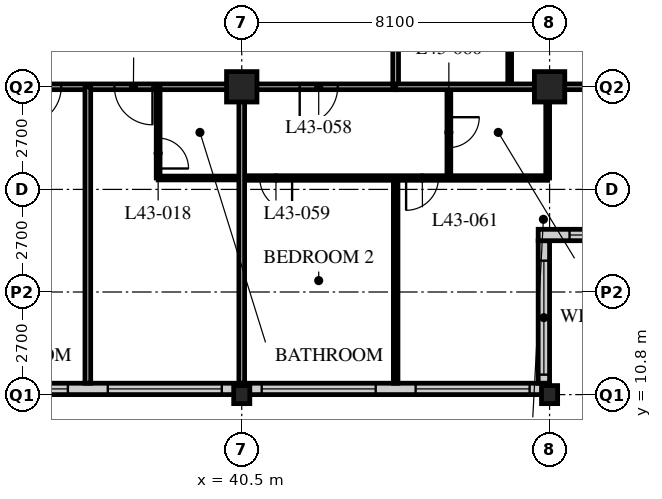
"""IFC4 building model, lengths in metres.
Left out: names, types, materials, properties, quantities, classifications, styles, units other than length and angle.
Written with IfcOpenShell. Run it as: python <this file> out.ifc"""

import sys

from ifc_helpers import new_model, si_unit, direction, frame, frame_2d, origin, origin_2d, place, context, subcontext, project, spatial, rectangle, hollow_rectangle, i_section, extrude, element, fill, save


model = new_model("IFC4")
c1 = context("Model", 3, precision=1e-05, world=origin(), true_north=direction((0.0, 1.0)))
c2 = subcontext(c1, "Body", "Model", "MODEL_VIEW")
j1 = project(units=[si_unit("LENGTHUNIT", "METRE"), si_unit("PLANEANGLEUNIT", "RADIAN")], contexts=[c1])
p1 = place(None, origin())
s1 = spatial("IfcSite", under=j1, at=p1, CompositionType="ELEMENT")
p2 = place(p1, origin())
s2 = spatial("IfcBuilding", under=s1, at=p2, CompositionType="ELEMENT")
p3 = place(p2, frame((0.0, 0.0, 170.4)))
s3 = spatial("IfcBuildingStorey", under=s2, at=p3, CompositionType="ELEMENT", Elevation=170.4)
p4 = place(p3, frame((40.5, 10.8, 0.0), z_axis=(0.0, 0.0, 1.0), x_axis=(1.0, 0.0, 0.0)))
e1 = element("IfcColumn", 1, at=p4, inside=s3, PredefinedType="COLUMN", context=c2, shape_type="SweptSolid", body=[
    extrude(i_section(OverallWidth=0.424, OverallDepth=0.475, WebThickness=0.048, FlangeThickness=0.077, FilletRadius=0.015, at=origin_2d()), origin(), (0.0, 0.0, 1.0), 3.6),
])
p5 = place(p3, frame((40.5, 18.9, 0.0), z_axis=(0.0, 0.0, 1.0), x_axis=(1.0, 0.0, 0.0)))
e2 = element("IfcColumn", 2, at=p5, inside=s3, PredefinedType="COLUMN", context=c2, shape_type="SweptSolid", body=[
    extrude(hollow_rectangle(XDim=0.8, YDim=0.8, WallThickness=0.08, at=origin_2d()), origin(), (0.0, 0.0, 1.0), 3.6),
])
p6 = place(p3, frame((48.6, 10.8, 0.0), z_axis=(0.0, 0.0, 1.0), x_axis=(1.0, 0.0, 0.0)))
e3 = element("IfcColumn", 3, at=p6, inside=s3, PredefinedType="COLUMN", context=c2, shape_type="SweptSolid", body=[
    extrude(i_section(OverallWidth=0.424, OverallDepth=0.475, WebThickness=0.048, FlangeThickness=0.077, FilletRadius=0.015, at=origin_2d()), origin(), (0.0, 0.0, 1.0), 3.6),
])
p7 = place(p3, frame((48.6, 18.9, 0.0), z_axis=(0.0, 0.0, 1.0), x_axis=(1.0, 0.0, 0.0)))
e4 = element("IfcColumn", 4, at=p7, inside=s3, PredefinedType="COLUMN", context=c2, shape_type="SweptSolid", body=[
    extrude(hollow_rectangle(XDim=0.8, YDim=0.8, WallThickness=0.08, at=origin_2d()), origin(), (0.0, 0.0, 1.0), 3.6),
])
p8 = place(p3, frame((8.4, 10.95, 0.0), z_axis=(0.0, 0.0, 1.0), x_axis=(1.0, 0.0, 0.0)))
e5 = element("IfcWall", 5, at=p8, inside=s3, PredefinedType="SOLIDWALL", context=c2, shape_type="SweptSolid", body=[
    extrude(rectangle(XDim=40.2, YDim=0.3, at=frame_2d((20.1, 0.0))), origin(), (0.0, 0.0, 1.0), 3.39),
])
p9 = place(p8, frame((0.225, 0.0, 0.6)))
e6 = element("IfcOpeningElement", 6, at=p9, cuts=e5, PredefinedType="OPENING", context=c2, shape_type="SweptSolid", body=[
    extrude(rectangle(XDim=3.0, YDim=2.4, at=frame_2d((1.5, 1.2))), frame((0.0, 0.16, 0.0), z_axis=(0.0, -1.0, 0.0), x_axis=(1.0, 0.0, 0.0)), (0.0, 0.0, 1.0), 0.32),
])
p10 = place(p8, frame((4.275, 0.0, 0.6)))
e7 = element("IfcOpeningElement", 7, at=p10, cuts=e5, PredefinedType="OPENING", context=c2, shape_type="SweptSolid", body=[
    extrude(rectangle(XDim=3.0, YDim=2.4, at=frame_2d((1.5, 1.2))), frame((0.0, 0.16, 0.0), z_axis=(0.0, -1.0, 0.0), x_axis=(1.0, 0.0, 0.0)), (0.0, 0.0, 1.0), 0.32),
])
p11 = place(p8, frame((8.325, 0.0, 0.6)))
e8 = element("IfcOpeningElement", 8, at=p11, cuts=e5, PredefinedType="OPENING", context=c2, shape_type="SweptSolid", body=[
    extrude(rectangle(XDim=3.0, YDim=2.4, at=frame_2d((1.5, 1.2))), frame((0.0, 0.16, 0.0), z_axis=(0.0, -1.0, 0.0), x_axis=(1.0, 0.0, 0.0)), (0.0, 0.0, 1.0), 0.32),
])
p12 = place(p8, frame((12.375, 0.0, 0.6)))
e9 = element("IfcOpeningElement", 9, at=p12, cuts=e5, PredefinedType="OPENING", context=c2, shape_type="SweptSolid", body=[
    extrude(rectangle(XDim=3.0, YDim=2.4, at=frame_2d((1.5, 1.2))), frame((0.0, 0.16, 0.0), z_axis=(0.0, -1.0, 0.0), x_axis=(1.0, 0.0, 0.0)), (0.0, 0.0, 1.0), 0.32),
])
p13 = place(p8, frame((16.425, 0.0, 0.6)))
e10 = element("IfcOpeningElement", 10, at=p13, cuts=e5, PredefinedType="OPENING", context=c2, shape_type="SweptSolid", body=[
    extrude(rectangle(XDim=3.0, YDim=2.4, at=frame_2d((1.5, 1.2))), frame((0.0, 0.16, 0.0), z_axis=(0.0, -1.0, 0.0), x_axis=(1.0, 0.0, 0.0)), (0.0, 0.0, 1.0), 0.32),
])
p14 = place(p8, frame((20.475, 0.0, 0.6)))
e11 = element("IfcOpeningElement", 11, at=p14, cuts=e5, PredefinedType="OPENING", context=c2, shape_type="SweptSolid", body=[
    extrude(rectangle(XDim=3.0, YDim=2.4, at=frame_2d((1.5, 1.2))), frame((0.0, 0.16, 0.0), z_axis=(0.0, -1.0, 0.0), x_axis=(1.0, 0.0, 0.0)), (0.0, 0.0, 1.0), 0.32),
])
p15 = place(p8, frame((24.525, 0.0, 0.6)))
e12 = element("IfcOpeningElement", 12, at=p15, cuts=e5, PredefinedType="OPENING", context=c2, shape_type="SweptSolid", body=[
    extrude(rectangle(XDim=3.0, YDim=2.4, at=frame_2d((1.5, 1.2))), frame((0.0, 0.16, 0.0), z_axis=(0.0, -1.0, 0.0), x_axis=(1.0, 0.0, 0.0)), (0.0, 0.0, 1.0), 0.32),
])
p16 = place(p8, frame((28.575, 0.0, 0.6)))
e13 = element("IfcOpeningElement", 13, at=p16, cuts=e5, PredefinedType="OPENING", context=c2, shape_type="SweptSolid", body=[
    extrude(rectangle(XDim=3.0, YDim=2.4, at=frame_2d((1.5, 1.2))), frame((0.0, 0.16, 0.0), z_axis=(0.0, -1.0, 0.0), x_axis=(1.0, 0.0, 0.0)), (0.0, 0.0, 1.0), 0.32),
])
p17 = place(p8, frame((32.625, 0.0, 0.6)))
e14 = element("IfcOpeningElement", 14, at=p17, cuts=e5, PredefinedType="OPENING", context=c2, shape_type="SweptSolid", body=[
    extrude(rectangle(XDim=3.0, YDim=2.4, at=frame_2d((1.5, 1.2))), frame((0.0, 0.16, 0.0), z_axis=(0.0, -1.0, 0.0), x_axis=(1.0, 0.0, 0.0)), (0.0, 0.0, 1.0), 0.32),
])
p18 = place(p8, frame((36.675, 0.0, 0.6)))
e15 = element("IfcOpeningElement", 15, at=p18, cuts=e5, PredefinedType="OPENING", context=c2, shape_type="SweptSolid", body=[
    extrude(rectangle(XDim=3.0, YDim=2.4, at=frame_2d((1.5, 1.2))), frame((0.0, 0.16, 0.0), z_axis=(0.0, -1.0, 0.0), x_axis=(1.0, 0.0, 0.0)), (0.0, 0.0, 1.0), 0.32),
])
p19 = place(p3, frame((48.45, 11.1, 0.0), z_axis=(0.0, 0.0, 1.0), x_axis=(0.0, 1.0, 0.0)))
e16 = element("IfcWall", 16, at=p19, inside=s3, PredefinedType="SOLIDWALL", context=c2, shape_type="SweptSolid", body=[
    extrude(rectangle(XDim=3.75, YDim=0.3, at=frame_2d((1.875, 0.0))), origin(), (0.0, 0.0, 1.0), 3.39),
])
p20 = place(p19, frame((0.225, 0.0, 0.6)))
e17 = element("IfcOpeningElement", 17, at=p20, cuts=e16, PredefinedType="OPENING", context=c2, shape_type="SweptSolid", body=[
    extrude(rectangle(XDim=3.0, YDim=2.0, at=frame_2d((1.5, 1.0))), frame((0.0, 0.16, 0.0), z_axis=(0.0, -1.0, 0.0), x_axis=(1.0, 0.0, 0.0)), (0.0, 0.0, 1.0), 0.32),
])
p21 = place(p3, frame((48.3, 15.0, 0.0), z_axis=(0.0, 0.0, 1.0), x_axis=(1.0, 0.0, 0.0)))
e18 = element("IfcWall", 18, at=p21, inside=s3, PredefinedType="SOLIDWALL", context=c2, shape_type="SweptSolid", body=[
    extrude(rectangle(XDim=4.35, YDim=0.3, at=frame_2d((2.175, 0.0))), origin(), (0.0, 0.0, 1.0), 3.39),
])
p22 = place(p21, frame((0.825, 0.0, 0.6)))
e19 = element("IfcOpeningElement", 19, at=p22, cuts=e18, PredefinedType="OPENING", context=c2, shape_type="SweptSolid", body=[
    extrude(rectangle(XDim=3.0, YDim=2.0, at=frame_2d((1.5, 1.0))), frame((0.0, 0.16, 0.0), z_axis=(0.0, -1.0, 0.0), x_axis=(1.0, 0.0, 0.0)), (0.0, 0.0, 1.0), 0.32),
])
p23 = place(p3, frame((12.15, 18.9, 0.0), z_axis=(0.0, 0.0, 1.0), x_axis=(1.0, 0.0, 0.0)))
e20 = element("IfcWall", 20, at=p23, inside=s3, PredefinedType="PARTITIONING", context=c2, shape_type="SweptSolid", body=[
    extrude(rectangle(XDim=32.4, YDim=0.15, at=frame_2d((16.2, 0.0))), origin(), (0.0, 0.0, 1.0), 2.778),
])
p24 = place(p23, frame((6.4, 0.0, 0.0)))
e21 = element("IfcOpeningElement", 21, at=p24, cuts=e20, PredefinedType="OPENING", context=c2, shape_type="SweptSolid", body=[
    extrude(rectangle(XDim=1.0, YDim=2.1, at=frame_2d((0.5, 1.05))), frame((0.0, 0.085, 0.0), z_axis=(0.0, -1.0, 0.0), x_axis=(1.0, 0.0, 0.0)), (0.0, 0.0, 1.0), 0.17),
])
p25 = place(p23, frame((8.8, 0.0, 0.0)))
e22 = element("IfcOpeningElement", 22, at=p25, cuts=e20, PredefinedType="OPENING", context=c2, shape_type="SweptSolid", body=[
    extrude(rectangle(XDim=1.0, YDim=2.1, at=frame_2d((0.5, 1.05))), frame((0.0, 0.085, 0.0), z_axis=(0.0, -1.0, 0.0), x_axis=(1.0, 0.0, 0.0)), (0.0, 0.0, 1.0), 0.17),
])
p26 = place(p23, frame((13.05, 0.0, 0.0)))
e23 = element("IfcOpeningElement", 23, at=p26, cuts=e20, PredefinedType="OPENING", context=c2, shape_type="SweptSolid", body=[
    extrude(rectangle(XDim=1.0, YDim=2.1, at=frame_2d((0.5, 1.05))), frame((0.0, 0.085, 0.0), z_axis=(0.0, -1.0, 0.0), x_axis=(1.0, 0.0, 0.0)), (0.0, 0.0, 1.0), 0.17),
])
p27 = place(p23, frame((22.6, 0.0, 0.0)))
e24 = element("IfcOpeningElement", 24, at=p27, cuts=e20, PredefinedType="OPENING", context=c2, shape_type="SweptSolid", body=[
    extrude(rectangle(XDim=1.0, YDim=2.1, at=frame_2d((0.5, 1.05))), frame((0.0, 0.085, 0.0), z_axis=(0.0, -1.0, 0.0), x_axis=(1.0, 0.0, 0.0)), (0.0, 0.0, 1.0), 0.17),
])
p28 = place(p23, frame((25.0, 0.0, 0.0)))
e25 = element("IfcOpeningElement", 25, at=p28, cuts=e20, PredefinedType="OPENING", context=c2, shape_type="SweptSolid", body=[
    extrude(rectangle(XDim=1.0, YDim=2.1, at=frame_2d((0.5, 1.05))), frame((0.0, 0.085, 0.0), z_axis=(0.0, -1.0, 0.0), x_axis=(1.0, 0.0, 0.0)), (0.0, 0.0, 1.0), 0.17),
])
p29 = place(p23, frame((1.525, 0.0, 0.0)))
e26 = element("IfcOpeningElement", 26, at=p29, cuts=e20, PredefinedType="OPENING", context=c2, shape_type="SweptSolid", body=[
    extrude(rectangle(XDim=1.0, YDim=2.1, at=frame_2d((0.5, 1.05))), frame((0.0, 0.085, 0.0), z_axis=(0.0, -1.0, 0.0), x_axis=(1.0, 0.0, 0.0)), (0.0, 0.0, 1.0), 0.17),
])
p30 = place(p23, frame((29.875, 0.0, 0.0)))
e27 = element("IfcOpeningElement", 27, at=p30, cuts=e20, PredefinedType="OPENING", context=c2, shape_type="SweptSolid", body=[
    extrude(rectangle(XDim=1.0, YDim=2.1, at=frame_2d((0.5, 1.05))), frame((0.0, 0.085, 0.0), z_axis=(0.0, -1.0, 0.0), x_axis=(1.0, 0.0, 0.0)), (0.0, 0.0, 1.0), 0.17),
])
p31 = place(p3, frame((44.55, 18.9, 0.0), z_axis=(0.0, 0.0, 1.0), x_axis=(0.0, 1.0, 0.0)))
e28 = element("IfcWall", 28, at=p31, inside=s3, PredefinedType="PARTITIONING", context=c2, shape_type="SweptSolid", body=[
    extrude(rectangle(XDim=24.3, YDim=0.15, at=frame_2d((12.15, 0.0))), origin(), (0.0, 0.0, 1.0), 3.39),
])
p32 = place(p31, frame((2.35, 0.0, 0.0)))
e29 = element("IfcOpeningElement", 29, at=p32, cuts=e28, PredefinedType="OPENING", context=c2, shape_type="SweptSolid", body=[
    extrude(rectangle(XDim=1.0, YDim=2.1, at=frame_2d((0.5, 1.05))), frame((0.0, 0.085, 0.0), z_axis=(0.0, -1.0, 0.0), x_axis=(1.0, 0.0, 0.0)), (0.0, 0.0, 1.0), 0.17),
])
p33 = place(p31, frame((4.45, 0.0, 0.0)))
e30 = element("IfcOpeningElement", 30, at=p33, cuts=e28, PredefinedType="OPENING", context=c2, shape_type="SweptSolid", body=[
    extrude(rectangle(XDim=1.0, YDim=2.1, at=frame_2d((0.5, 1.05))), frame((0.0, 0.085, 0.0), z_axis=(0.0, -1.0, 0.0), x_axis=(1.0, 0.0, 0.0)), (0.0, 0.0, 1.0), 0.17),
])
p34 = place(p31, frame((18.55, 0.0, 0.0)))
e31 = element("IfcOpeningElement", 31, at=p34, cuts=e28, PredefinedType="OPENING", context=c2, shape_type="SweptSolid", body=[
    extrude(rectangle(XDim=1.0, YDim=2.1, at=frame_2d((0.5, 1.05))), frame((0.0, 0.085, 0.0), z_axis=(0.0, -1.0, 0.0), x_axis=(1.0, 0.0, 0.0)), (0.0, 0.0, 1.0), 0.17),
])
p35 = place(p31, frame((22.6, 0.0, 0.0)))
e32 = element("IfcOpeningElement", 32, at=p35, cuts=e28, PredefinedType="OPENING", context=c2, shape_type="SweptSolid", body=[
    extrude(rectangle(XDim=1.0, YDim=2.1, at=frame_2d((0.5, 1.05))), frame((0.0, 0.085, 0.0), z_axis=(0.0, -1.0, 0.0), x_axis=(1.0, 0.0, 0.0)), (0.0, 0.0, 1.0), 0.17),
])
p36 = place(p3, frame((36.45, 18.9, 0.0), z_axis=(0.0, 0.0, 1.0), x_axis=(0.0, -1.0, 0.0)))
e33 = element("IfcWall", 33, at=p36, inside=s3, PredefinedType="PARTITIONING", context=c2, shape_type="SweptSolid", body=[
    extrude(rectangle(XDim=7.8, YDim=0.15, at=frame_2d((3.9, 0.0))), origin(), (0.0, 0.0, 1.0), 3.39),
])
p37 = place(p3, frame((38.3, 16.5, 0.0), z_axis=(0.0, 0.0, 1.0), x_axis=(1.0, 0.0, 0.0)))
e34 = element("IfcWall", 34, at=p37, inside=s3, PredefinedType="PARTITIONING", context=c2, shape_type="SweptSolid", body=[
    extrude(rectangle(XDim=2.2, YDim=0.1, at=frame_2d((1.1, 0.0))), origin(), (0.0, 0.0, 1.0), 3.39),
])
p38 = place(p3, frame((38.3, 18.9, 0.0), z_axis=(0.0, 0.0, 1.0), x_axis=(0.0, -1.0, 0.0)))
e35 = element("IfcWall", 35, at=p38, inside=s3, PredefinedType="PARTITIONING", context=c2, shape_type="SweptSolid", body=[
    extrude(rectangle(XDim=2.4, YDim=0.1, at=frame_2d((1.2, 0.0))), origin(), (0.0, 0.0, 1.0), 3.39),
])
p39 = place(p38, frame((1.35, 0.0, 0.0)))
e36 = element("IfcOpeningElement", 36, at=p39, cuts=e35, PredefinedType="OPENING", context=c2, shape_type="SweptSolid", body=[
    extrude(rectangle(XDim=0.8, YDim=2.1, at=frame_2d((0.4, 1.05))), frame((0.0, 0.06, 0.0), z_axis=(0.0, -1.0, 0.0), x_axis=(1.0, 0.0, 0.0)), (0.0, 0.0, 1.0), 0.12),
])
p40 = place(p3, frame((47.55, 18.9, 0.0), z_axis=(0.0, 0.0, 1.0), x_axis=(0.0, 1.0, 0.0)))
e37 = element("IfcWall", 37, at=p40, inside=s3, PredefinedType="PARTITIONING", context=c2, shape_type="SweptSolid", body=[
    extrude(rectangle(XDim=2.2, YDim=0.1, at=frame_2d((1.1, 0.0))), origin(), (0.0, 0.0, 1.0), 3.39),
])
p41 = place(p3, frame((40.5, 16.5, 0.0), z_axis=(0.0, 0.0, 1.0), x_axis=(1.0, 0.0, 0.0)))
e38 = element("IfcWall", 38, at=p41, inside=s3, PredefinedType="PARTITIONING", context=c2, shape_type="SweptSolid", body=[
    extrude(rectangle(XDim=8.05, YDim=0.12, at=frame_2d((4.025, 0.0))), origin(), (0.0, 0.0, 1.0), 3.39),
])
p42 = place(p41, frame((0.475, 0.0, 0.0)))
e39 = element("IfcOpeningElement", 39, at=p42, cuts=e38, PredefinedType="OPENING", context=c2, shape_type="SweptSolid", body=[
    extrude(rectangle(XDim=0.85, YDim=2.1, at=frame_2d((0.425, 1.05))), frame((0.0, 0.07, 0.0), z_axis=(0.0, -1.0, 0.0), x_axis=(1.0, 0.0, 0.0)), (0.0, 0.0, 1.0), 0.14),
])
p43 = place(p41, frame((4.325, 0.0, 0.0)))
e40 = element("IfcOpeningElement", 40, at=p43, cuts=e38, PredefinedType="OPENING", context=c2, shape_type="SweptSolid", body=[
    extrude(rectangle(XDim=0.85, YDim=2.1, at=frame_2d((0.425, 1.05))), frame((0.0, 0.07, 0.0), z_axis=(0.0, -1.0, 0.0), x_axis=(1.0, 0.0, 0.0)), (0.0, 0.0, 1.0), 0.14),
])
p44 = place(p3, frame((45.95, 18.9, 0.0), z_axis=(0.0, 0.0, 1.0), x_axis=(0.0, -1.0, 0.0)))
e41 = element("IfcWall", 41, at=p44, inside=s3, PredefinedType="PARTITIONING", context=c2, shape_type="SweptSolid", body=[
    extrude(rectangle(XDim=2.4, YDim=0.1, at=frame_2d((1.2, 0.0))), origin(), (0.0, 0.0, 1.0), 3.39),
])
p45 = place(p44, frame((0.8, 0.0, 0.0)))
e42 = element("IfcOpeningElement", 42, at=p45, cuts=e41, PredefinedType="OPENING", context=c2, shape_type="SweptSolid", body=[
    extrude(rectangle(XDim=0.8, YDim=2.1, at=frame_2d((0.4, 1.05))), frame((0.0, 0.06, 0.0), z_axis=(0.0, -1.0, 0.0), x_axis=(1.0, 0.0, 0.0)), (0.0, 0.0, 1.0), 0.12),
])
p46 = place(p3, frame((48.55, 18.9, 0.0), z_axis=(0.0, 0.0, 1.0), x_axis=(0.0, -1.0, 0.0)))
e43 = element("IfcWall", 43, at=p46, inside=s3, PredefinedType="PARTITIONING", context=c2, shape_type="SweptSolid", body=[
    extrude(rectangle(XDim=2.4, YDim=0.1, at=frame_2d((1.2, 0.0))), origin(), (0.0, 0.0, 1.0), 2.778),
])
p47 = place(p3, frame((44.55, 16.5, 0.0), z_axis=(0.0, 0.0, 1.0), x_axis=(0.0, -1.0, 0.0)))
e44 = element("IfcWall", 44, at=p47, inside=s3, PredefinedType="PARTITIONING", context=c2, shape_type="SweptSolid", body=[
    extrude(rectangle(XDim=5.4, YDim=0.12, at=frame_2d((2.7, 0.0))), origin(), (0.0, 0.0, 1.0), 3.39),
])
p48 = place(p3, frame((44.55, 18.9, 0.0), z_axis=(0.0, 0.0, 1.0), x_axis=(1.0, 0.0, 0.0)))
e45 = element("IfcWall", 45, at=p48, inside=s3, PredefinedType="PARTITIONING", context=c2, shape_type="SweptSolid", body=[
    extrude(rectangle(XDim=7.8, YDim=0.15, at=frame_2d((3.9, 0.0))), origin(), (0.0, 0.0, 1.0), 2.778),
])
p49 = place(p3, frame((40.5, 18.9, 0.0), z_axis=(0.0, 0.0, 1.0), x_axis=(0.0, -1.0, 0.0)))
e46 = element("IfcWall", 46, at=p49, inside=s3, PredefinedType="PARTITIONING", context=c2, shape_type="SweptSolid", body=[
    extrude(rectangle(XDim=7.8, YDim=0.15, at=frame_2d((3.9, 0.0))), origin(), (0.0, 0.0, 1.0), 2.778),
])
p50 = place(p15, origin())
e47 = element("IfcWindow", 47, at=p50, inside=s3, PartitioningType="SINGLE_PANEL", PredefinedType="WINDOW", context=c2, shape_type="SweptSolid", body=[
    extrude(rectangle(XDim=3.0, YDim=2.4, at=frame_2d((1.5, 1.2))), frame((0.0, 0.03, 0.0), z_axis=(0.0, -1.0, 0.0), x_axis=(1.0, 0.0, 0.0)), (0.0, 0.0, 1.0), 0.06),
])
fill(e12, e47)
p51 = place(p16, origin())
e48 = element("IfcWindow", 48, at=p51, inside=s3, PartitioningType="SINGLE_PANEL", PredefinedType="WINDOW", context=c2, shape_type="SweptSolid", body=[
    extrude(rectangle(XDim=3.0, YDim=2.4, at=frame_2d((1.5, 1.2))), frame((0.0, 0.03, 0.0), z_axis=(0.0, -1.0, 0.0), x_axis=(1.0, 0.0, 0.0)), (0.0, 0.0, 1.0), 0.06),
])
fill(e13, e48)
p52 = place(p17, origin())
e49 = element("IfcWindow", 49, at=p52, inside=s3, PartitioningType="SINGLE_PANEL", PredefinedType="WINDOW", context=c2, shape_type="SweptSolid", body=[
    extrude(rectangle(XDim=3.0, YDim=2.4, at=frame_2d((1.5, 1.2))), frame((0.0, 0.03, 0.0), z_axis=(0.0, -1.0, 0.0), x_axis=(1.0, 0.0, 0.0)), (0.0, 0.0, 1.0), 0.06),
])
fill(e14, e49)
p53 = place(p18, origin())
e50 = element("IfcWindow", 50, at=p53, inside=s3, PartitioningType="SINGLE_PANEL", PredefinedType="WINDOW", context=c2, shape_type="SweptSolid", body=[
    extrude(rectangle(XDim=3.0, YDim=2.4, at=frame_2d((1.5, 1.2))), frame((0.0, 0.03, 0.0), z_axis=(0.0, -1.0, 0.0), x_axis=(1.0, 0.0, 0.0)), (0.0, 0.0, 1.0), 0.06),
])
fill(e15, e50)
p54 = place(p20, origin())
e51 = element("IfcWindow", 51, at=p54, inside=s3, PartitioningType="SINGLE_PANEL", PredefinedType="WINDOW", context=c2, shape_type="SweptSolid", body=[
    extrude(rectangle(XDim=3.0, YDim=2.0, at=frame_2d((1.5, 1.0))), frame((0.0, 0.03, 0.0), z_axis=(0.0, -1.0, 0.0), x_axis=(1.0, 0.0, 0.0)), (0.0, 0.0, 1.0), 0.06),
])
fill(e17, e51)
p55 = place(p22, origin())
e52 = element("IfcWindow", 52, at=p55, inside=s3, PartitioningType="SINGLE_PANEL", PredefinedType="WINDOW", context=c2, shape_type="SweptSolid", body=[
    extrude(rectangle(XDim=3.0, YDim=2.0, at=frame_2d((1.5, 1.0))), frame((0.0, 0.03, 0.0), z_axis=(0.0, -1.0, 0.0), x_axis=(1.0, 0.0, 0.0)), (0.0, 0.0, 1.0), 0.06),
])
fill(e19, e52)
p56 = place(p27, origin())
e53 = element("IfcDoor", 53, at=p56, inside=s3, OperationType="SINGLE_SWING_RIGHT", PredefinedType="DOOR", context=c2, shape_type="SweptSolid", body=[
    extrude(rectangle(XDim=1.0, YDim=2.1, at=frame_2d((0.5, 1.05))), frame((0.0, 0.025, 0.0), z_axis=(0.0, -1.0, 0.0), x_axis=(1.0, 0.0, 0.0)), (0.0, 0.0, 1.0), 0.05),
])
fill(e24, e53)
p57 = place(p39, origin())
e54 = element("IfcDoor", 54, at=p57, inside=s3, OperationType="SINGLE_SWING_RIGHT", PredefinedType="DOOR", context=c2, shape_type="SweptSolid", body=[
    extrude(rectangle(XDim=0.8, YDim=2.1, at=frame_2d((0.4, 1.05))), frame((0.0, 0.025, 0.0), z_axis=(0.0, -1.0, 0.0), x_axis=(1.0, 0.0, 0.0)), (0.0, 0.0, 1.0), 0.05),
])
fill(e36, e54)
p58 = place(p28, origin())
e55 = element("IfcDoor", 55, at=p58, inside=s3, OperationType="SINGLE_SWING_LEFT", PredefinedType="DOOR", context=c2, shape_type="SweptSolid", body=[
    extrude(rectangle(XDim=1.0, YDim=2.1, at=frame_2d((0.5, 1.05))), frame((0.0, 0.025, 0.0), z_axis=(0.0, -1.0, 0.0), x_axis=(1.0, 0.0, 0.0)), (0.0, 0.0, 1.0), 0.05),
])
fill(e25, e55)
p59 = place(p30, origin())
e56 = element("IfcDoor", 56, at=p59, inside=s3, OperationType="SINGLE_SWING_RIGHT", PredefinedType="DOOR", context=c2, shape_type="SweptSolid", body=[
    extrude(rectangle(XDim=1.0, YDim=2.1, at=frame_2d((0.5, 1.05))), frame((0.0, 0.025, 0.0), z_axis=(0.0, -1.0, 0.0), x_axis=(1.0, 0.0, 0.0)), (0.0, 0.0, 1.0), 0.05),
])
fill(e27, e56)
p60 = place(p42, origin())
e57 = element("IfcDoor", 57, at=p60, inside=s3, OperationType="SINGLE_SWING_LEFT", PredefinedType="DOOR", context=c2, shape_type="SweptSolid", body=[
    extrude(rectangle(XDim=0.85, YDim=2.1, at=frame_2d((0.425, 1.05))), frame((0.0, 0.025, 0.0), z_axis=(0.0, -1.0, 0.0), x_axis=(1.0, 0.0, 0.0)), (0.0, 0.0, 1.0), 0.05),
])
fill(e39, e57)
p61 = place(p45, origin())
e58 = element("IfcDoor", 58, at=p61, inside=s3, OperationType="SINGLE_SWING_LEFT", PredefinedType="DOOR", context=c2, shape_type="SweptSolid", body=[
    extrude(rectangle(XDim=0.8, YDim=2.1, at=frame_2d((0.4, 1.05))), frame((0.0, 0.025, 0.0), z_axis=(0.0, -1.0, 0.0), x_axis=(1.0, 0.0, 0.0)), (0.0, 0.0, 1.0), 0.05),
])
fill(e42, e58)
p62 = place(p43, origin())
e59 = element("IfcDoor", 59, at=p62, inside=s3, OperationType="SINGLE_SWING_RIGHT", PredefinedType="DOOR", context=c2, shape_type="SweptSolid", body=[
    extrude(rectangle(XDim=0.85, YDim=2.1, at=frame_2d((0.425, 1.05))), frame((0.0, 0.025, 0.0), z_axis=(0.0, -1.0, 0.0), x_axis=(1.0, 0.0, 0.0)), (0.0, 0.0, 1.0), 0.05),
])
fill(e40, e59)
save(model, sys.argv[1])
